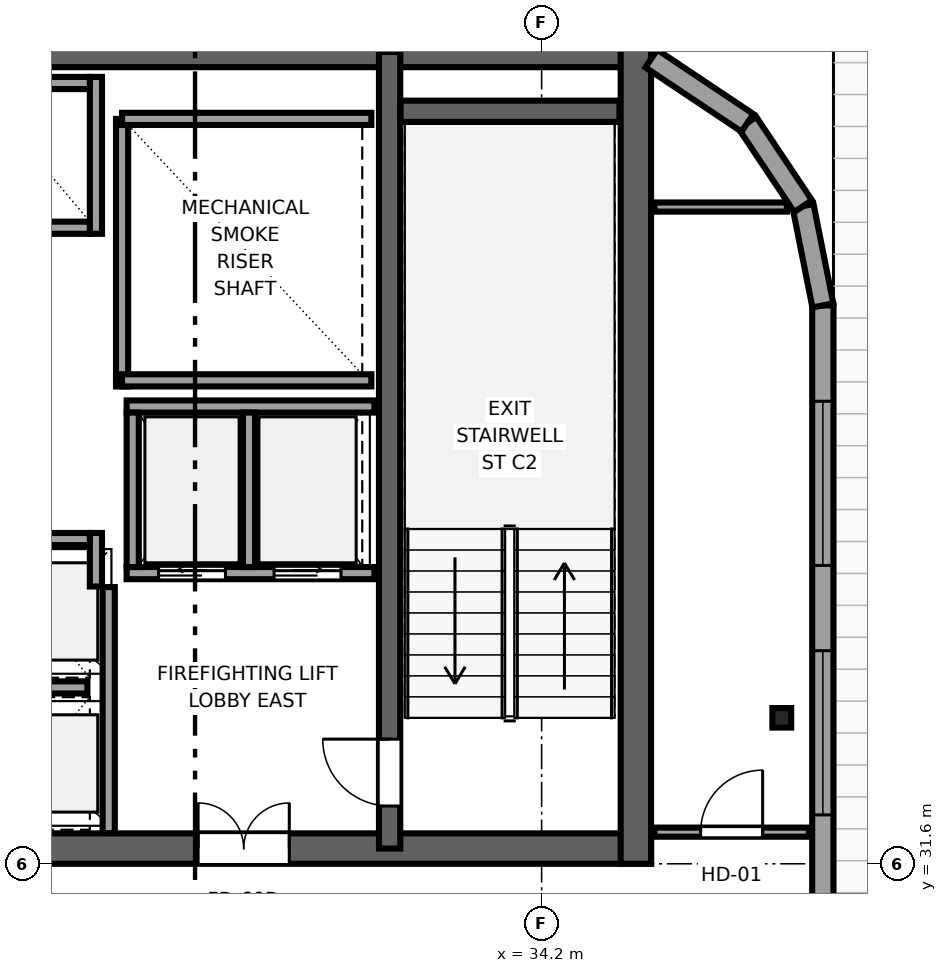
"""IFC4 building model, lengths in metres.
Left out: names, types, materials, properties, quantities, classifications, styles, units other than length and angle.
Written with IfcOpenShell. Run it as: python <this file> out.ifc"""

import sys

from ifc_helpers import new_model, si_unit, direction, frame, frame_2d, origin, origin_2d, place, context, subcontext, project, spatial, rectangle, i_section, extrude, source, transform, mapped, element, fill, save


model = new_model("IFC4")
c1 = context("Model", 3, precision=1e-05, world=origin(), true_north=direction((0.0, 1.0)))
c2 = subcontext(c1, "Body", "Model", "MODEL_VIEW")
j1 = project(units=[si_unit("LENGTHUNIT", "METRE"), si_unit("PLANEANGLEUNIT", "RADIAN")], contexts=[c1])
p1 = place(None, origin())
s1 = spatial("IfcSite", under=j1, at=p1, CompositionType="ELEMENT")
p2 = place(p1, origin())
s2 = spatial("IfcBuilding", under=s1, at=p2, CompositionType="ELEMENT")
p3 = place(p2, frame((0.0, 0.0, 241.65)))
s3 = spatial("IfcBuildingStorey", under=s2, at=p3, CompositionType="ELEMENT", Elevation=241.65)
p4 = place(p3, frame((10.0, 31.85, 0.0), z_axis=(0.0, 0.0, 1.0), x_axis=(1.0, 0.0, 0.0)))
e1 = element("IfcWall", 1, at=p4, inside=s3, PredefinedType="SHEAR", context=c2, shape_type="SweptSolid", body=[
    extrude(rectangle(XDim=26.0, YDim=0.5, at=frame_2d((13.0, 0.0))), origin(), (0.0, 0.0, 1.0), 3.55),
])
p5 = place(p4, frame((7.45, 0.0, 0.0), z_axis=(0.0, 0.0, 1.0), x_axis=(-1.0, 0.0, 0.0)))
e2 = element("IfcOpeningElement", 2, at=p5, cuts=e1, PredefinedType="OPENING", context=c2, shape_type="SweptSolid", body=[
    extrude(rectangle(XDim=1.5, YDim=2.04, at=frame_2d((0.75, 1.02))), frame((0.0, 0.26, 0.0), z_axis=(0.0, -1.0, 0.0), x_axis=(1.0, 0.0, 0.0)), (0.0, 0.0, 1.0), 0.52),
])
p6 = place(p4, frame((13.75, 0.0, 0.0), z_axis=(0.0, 0.0, 1.0), x_axis=(-1.0, 0.0, 0.0)))
e3 = element("IfcOpeningElement", 3, at=p6, cuts=e1, PredefinedType="OPENING", context=c2, shape_type="SweptSolid", body=[
    extrude(rectangle(XDim=1.5, YDim=2.04, at=frame_2d((0.75, 1.02))), frame((0.0, 0.26, 0.0), z_axis=(0.0, -1.0, 0.0), x_axis=(1.0, 0.0, 0.0)), (0.0, 0.0, 1.0), 0.52),
])
p7 = place(p4, frame((20.05, 0.0, 0.0), z_axis=(0.0, 0.0, 1.0), x_axis=(-1.0, 0.0, 0.0)))
e4 = element("IfcOpeningElement", 4, at=p7, cuts=e1, PredefinedType="OPENING", context=c2, shape_type="SweptSolid", body=[
    extrude(rectangle(XDim=1.5, YDim=2.04, at=frame_2d((0.75, 1.02))), frame((0.0, 0.26, 0.0), z_axis=(0.0, -1.0, 0.0), x_axis=(1.0, 0.0, 0.0)), (0.0, 0.0, 1.0), 0.52),
])
p8 = place(p3, frame((10.0, 44.95, 0.0), z_axis=(0.0, 0.0, 1.0), x_axis=(1.0, 0.0, 0.0)))
e5 = element("IfcWall", 5, at=p8, inside=s3, PredefinedType="SHEAR", context=c2, shape_type="SweptSolid", body=[
    extrude(rectangle(XDim=26.0, YDim=0.5, at=frame_2d((13.0, 0.0))), origin(), (0.0, 0.0, 1.0), 3.55),
])
p9 = place(p3, frame((35.75, 31.6, 0.0), z_axis=(0.0, 0.0, 1.0), x_axis=(0.0, 1.0, 0.0)))
e6 = element("IfcWall", 6, at=p9, inside=s3, PredefinedType="SHEAR", context=c2, shape_type="SweptSolid", body=[
    extrude(rectangle(XDim=13.6, YDim=0.5, at=frame_2d((6.8, 0.0))), origin(), (0.0, 0.0, 1.0), 3.55),
])
p10 = place(p3, frame((31.7, 31.85, 0.0), z_axis=(0.0, 0.0, 1.0), x_axis=(0.0, 1.0, 0.0)))
e7 = element("IfcWall", 7, at=p10, inside=s3, PredefinedType="SHEAR", context=c2, shape_type="SweptSolid", body=[
    extrude(rectangle(XDim=13.1, YDim=0.35, at=frame_2d((6.55, 0.0))), origin(), (0.0, 0.0, 1.0), 3.55),
])
p11 = place(p10, frame((1.8, 0.0, 0.0), z_axis=(0.0, 0.0, 1.0), x_axis=(-1.0, 0.0, 0.0)))
e8 = element("IfcOpeningElement", 8, at=p11, cuts=e7, PredefinedType="OPENING", context=c2, shape_type="SweptSolid", body=[
    extrude(rectangle(XDim=1.1, YDim=2.12, at=frame_2d((0.55, 1.06))), frame((0.0, 0.185, 0.0), z_axis=(0.0, -1.0, 0.0), x_axis=(1.0, 0.0, 0.0)), (0.0, 0.0, 1.0), 0.37),
])
p12 = place(p3, frame((31.88, 43.975, 0.0), z_axis=(0.0, 0.0, 1.0), x_axis=(1.0, 0.0, 0.0)))
e9 = element("IfcWall", 9, at=p12, inside=s3, PredefinedType="SHEAR", context=c2, shape_type="SweptSolid", body=[
    extrude(rectangle(XDim=3.6, YDim=0.35, at=frame_2d((1.8, 0.0))), origin(), (0.0, 0.0, 1.0), 3.55),
])
m1 = source(origin(), c2, "Body", "SweptSolid", [
    extrude(i_section(OverallWidth=0.309, OverallDepth=0.321, WebThickness=0.014, FlangeThickness=0.022, FilletRadius=0.017, at=origin_2d()), origin(), (0.0, 0.0, 1.0), 3.55),
])
p13 = place(p3, frame((38.15, 34.0, 0.0), z_axis=(0.0, 0.0, 1.0), x_axis=(1.0, 0.0, 0.0)))
e10 = element("IfcColumn", 10, at=p13, inside=s3, PredefinedType="COLUMN", context=c2, shape_type="MappedRepresentation", body=[
    mapped(m1, transform((0.0, 0.0, 0.0), x_axis=(1.0, 0.0, 0.0), y_axis=(0.0, 1.0, 0.0), z_axis=(0.0, 0.0, 1.0), scale=1.0)),
])
p14 = place(p3, frame((38.825, 7.017, 0.0), z_axis=(0.0, 0.0, 1.0), x_axis=(0.0, 1.0, 0.0)))
e11 = element("IfcWall", 11, at=p14, inside=s3, PredefinedType="SOLIDWALL", context=c2, shape_type="SweptSolid", body=[
    extrude(rectangle(XDim=33.766, YDim=0.35, at=frame_2d((16.883, 0.0))), origin(), (0.0, 0.0, 1.0), 3.37),
])
p15 = place(p14, frame((1.576, 0.0, 0.68)))
e12 = element("IfcOpeningElement", 12, at=p15, cuts=e11, PredefinedType="OPENING", context=c2, shape_type="SweptSolid", body=[
    extrude(rectangle(XDim=2.7, YDim=1.95, at=frame_2d((1.35, 0.975))), frame((0.0, 0.185, 0.0), z_axis=(0.0, -1.0, 0.0), x_axis=(1.0, 0.0, 0.0)), (0.0, 0.0, 1.0), 0.37),
])
p16 = place(p14, frame((6.228, 0.0, 0.68)))
e13 = element("IfcOpeningElement", 13, at=p16, cuts=e11, PredefinedType="OPENING", context=c2, shape_type="SweptSolid", body=[
    extrude(rectangle(XDim=2.7, YDim=1.95, at=frame_2d((1.35, 0.975))), frame((0.0, 0.185, 0.0), z_axis=(0.0, -1.0, 0.0), x_axis=(1.0, 0.0, 0.0)), (0.0, 0.0, 1.0), 0.37),
])
p17 = place(p14, frame((10.881, 0.0, 0.68)))
e14 = element("IfcOpeningElement", 14, at=p17, cuts=e11, PredefinedType="OPENING", context=c2, shape_type="SweptSolid", body=[
    extrude(rectangle(XDim=2.7, YDim=1.95, at=frame_2d((1.35, 0.975))), frame((0.0, 0.185, 0.0), z_axis=(0.0, -1.0, 0.0), x_axis=(1.0, 0.0, 0.0)), (0.0, 0.0, 1.0), 0.37),
])
p18 = place(p14, frame((15.533, 0.0, 0.68)))
e15 = element("IfcOpeningElement", 15, at=p18, cuts=e11, PredefinedType="OPENING", context=c2, shape_type="SweptSolid", body=[
    extrude(rectangle(XDim=2.7, YDim=1.95, at=frame_2d((1.35, 0.975))), frame((0.0, 0.185, 0.0), z_axis=(0.0, -1.0, 0.0), x_axis=(1.0, 0.0, 0.0)), (0.0, 0.0, 1.0), 0.37),
])
p19 = place(p14, frame((19.635, 0.0, 0.68)))
e16 = element("IfcOpeningElement", 16, at=p19, cuts=e11, PredefinedType="OPENING", context=c2, shape_type="SweptSolid", body=[
    extrude(rectangle(XDim=2.7, YDim=1.95, at=frame_2d((1.35, 0.975))), frame((0.0, 0.185, 0.0), z_axis=(0.0, -1.0, 0.0), x_axis=(1.0, 0.0, 0.0)), (0.0, 0.0, 1.0), 0.37),
])
p20 = place(p14, frame((25.387, 0.0, 0.68)))
e17 = element("IfcOpeningElement", 17, at=p20, cuts=e11, PredefinedType="OPENING", context=c2, shape_type="SweptSolid", body=[
    extrude(rectangle(XDim=2.7, YDim=1.95, at=frame_2d((1.35, 0.975))), frame((0.0, 0.185, 0.0), z_axis=(0.0, -1.0, 0.0), x_axis=(1.0, 0.0, 0.0)), (0.0, 0.0, 1.0), 0.37),
])
p21 = place(p14, frame((29.489, 0.0, 0.68)))
e18 = element("IfcOpeningElement", 18, at=p21, cuts=e11, PredefinedType="OPENING", context=c2, shape_type="SweptSolid", body=[
    extrude(rectangle(XDim=2.7, YDim=1.95, at=frame_2d((1.35, 0.975))), frame((0.0, 0.185, 0.0), z_axis=(0.0, -1.0, 0.0), x_axis=(1.0, 0.0, 0.0)), (0.0, 0.0, 1.0), 0.37),
])
p22 = place(p3, frame((38.825, 40.783, 0.0), z_axis=(0.0, 0.0, 1.0), x_axis=(-0.195044345786, 0.980794424524, 0.0)))
e19 = element("IfcWall", 19, at=p22, inside=s3, PredefinedType="SOLIDWALL", context=c2, shape_type="SweptSolid", body=[
    extrude(rectangle(XDim=1.665, YDim=0.35, at=frame_2d((0.833, 0.0))), origin(), (0.0, 0.0, 1.0), 3.37),
])
p23 = place(p3, frame((38.5, 42.416, 0.0), z_axis=(0.0, 0.0, 1.0), x_axis=(-0.555520825599, 0.831502623162, 0.0)))
e20 = element("IfcWall", 20, at=p23, inside=s3, PredefinedType="SOLIDWALL", context=c2, shape_type="SweptSolid", body=[
    extrude(rectangle(XDim=1.647, YDim=0.35, at=frame_2d((0.824, 0.0))), origin(), (0.0, 0.0, 1.0), 3.37),
])
p24 = place(p3, frame((37.585, 43.785, 0.0), z_axis=(0.0, 0.0, 1.0), x_axis=(-0.831516639465, 0.555499845448, 0.0)))
e21 = element("IfcWall", 21, at=p24, inside=s3, PredefinedType="SOLIDWALL", context=c2, shape_type="SweptSolid", body=[
    extrude(rectangle(XDim=1.902, YDim=0.35, at=frame_2d((0.951, 0.0))), origin(), (0.0, 0.0, 1.0), 3.37),
])
p25 = place(p3, frame((27.3, 39.45, 0.0), z_axis=(0.0, 0.0, 1.0), x_axis=(0.0, 1.0, 0.0)))
e22 = element("IfcWall", 22, at=p25, inside=s3, PredefinedType="SOLIDWALL", context=c2, shape_type="SweptSolid", body=[
    extrude(rectangle(XDim=4.4, YDim=0.2, at=frame_2d((2.2, 0.0))), origin(), (0.0, 0.0, 1.0), 3.37),
])
for number, where, z_axis, x_axis in (
    (23, (27.3, 39.55, 0.0), (0.0, 0.0, 1.0), (1.0, 0.0, 0.0)),
    (24, (27.3, 43.85, 0.0), (0.0, 0.0, 1.0), (1.0, 0.0, 0.0)),
):
    element("IfcWall", number, at=place(p3, frame(where, z_axis=z_axis, x_axis=x_axis)), inside=s3, PredefinedType="SOLIDWALL", context=c2, shape_type="SweptSolid", body=[
        extrude(rectangle(XDim=4.1, YDim=0.2, at=frame_2d((2.05, 0.0))), origin(), (0.0, 0.0, 1.0), 3.37),
    ])
p26 = place(p3, frame((27.08, 32.104, 0.0), z_axis=(0.0, 0.0, 1.0), x_axis=(0.0, 1.0, 0.0)))
e25 = element("IfcWall", 25, at=p26, inside=s3, PredefinedType="SOLIDWALL", context=c2, shape_type="SweptSolid", body=[
    extrude(rectangle(XDim=4.046, YDim=0.2, at=frame_2d((2.023, 0.0))), origin(), (0.0, 0.0, 1.0), 3.37),
])
p27 = place(p3, frame((27.375, 36.38, 0.0), z_axis=(0.0, 0.0, 1.0), x_axis=(1.0, 0.0, 0.0)))
e26 = element("IfcWall", 26, at=p27, inside=s3, PredefinedType="SOLIDWALL", context=c2, shape_type="SweptSolid", body=[
    extrude(rectangle(XDim=4.075, YDim=0.2, at=frame_2d((2.038, 0.0))), origin(), (0.0, 0.0, 1.0), 3.37),
])
p28 = place(p27, frame((0.525, 0.0, 0.0)))
e27 = element("IfcOpeningElement", 27, at=p28, cuts=e26, PredefinedType="OPENING", context=c2, shape_type="SweptSolid", body=[
    extrude(rectangle(XDim=1.1, YDim=2.12, at=frame_2d((0.55, 1.06))), frame((0.0, 0.11, 0.0), z_axis=(0.0, -1.0, 0.0), x_axis=(1.0, 0.0, 0.0)), (0.0, 0.0, 1.0), 0.22),
])
p29 = place(p27, frame((2.425, 0.0, 0.0)))
e28 = element("IfcOpeningElement", 28, at=p29, cuts=e26, PredefinedType="OPENING", context=c2, shape_type="SweptSolid", body=[
    extrude(rectangle(XDim=1.1, YDim=2.12, at=frame_2d((0.55, 1.06))), frame((0.0, 0.11, 0.0), z_axis=(0.0, -1.0, 0.0), x_axis=(1.0, 0.0, 0.0)), (0.0, 0.0, 1.0), 0.22),
])
p30 = place(p3, frame((27.375, 39.12, 0.0), z_axis=(0.0, 0.0, 1.0), x_axis=(1.0, 0.0, 0.0)))
e29 = element("IfcWall", 29, at=p30, inside=s3, PredefinedType="SOLIDWALL", context=c2, shape_type="SweptSolid", body=[
    extrude(rectangle(XDim=4.075, YDim=0.2, at=frame_2d((2.038, 0.0))), origin(), (0.0, 0.0, 1.0), 3.37),
])
for number, where, z_axis, x_axis in (
    (30, (27.475, 36.48, 0.0), (0.0, 0.0, 1.0), (0.0, 1.0, 0.0)),
    (31, (29.387, 36.48, 0.0), (0.0, 0.0, 1.0), (0.0, 1.0, 0.0)),
):
    element("IfcWall", number, at=place(p3, frame(where, z_axis=z_axis, x_axis=x_axis)), inside=s3, PredefinedType="SOLIDWALL", context=c2, shape_type="SweptSolid", body=[
        extrude(rectangle(XDim=2.54, YDim=0.2, at=frame_2d((1.27, 0.0))), origin(), (0.0, 0.0, 1.0), 3.37),
    ])
p31 = place(p3, frame((26.87, 36.16, 0.0), z_axis=(0.0, 0.0, 1.0), x_axis=(0.0, 1.0, 0.0)))
e32 = element("IfcWall", 32, at=p31, inside=s3, PredefinedType="SOLIDWALL", context=c2, shape_type="SweptSolid", body=[
    extrude(rectangle(XDim=0.88, YDim=0.2, at=frame_2d((0.44, 0.0))), origin(), (0.0, 0.0, 1.0), 3.37),
])
p32 = place(p3, frame((24.93, 36.94, 0.0), z_axis=(0.0, 0.0, 1.0), x_axis=(1.0, 0.0, 0.0)))
e33 = element("IfcWall", 33, at=p32, inside=s3, PredefinedType="SOLIDWALL", context=c2, shape_type="SweptSolid", body=[
    extrude(rectangle(XDim=1.84, YDim=0.2, at=frame_2d((0.92, 0.0))), origin(), (0.0, 0.0, 1.0), 3.37),
])
p33 = place(p3, frame((24.93, 34.5, 0.0), z_axis=(0.0, 0.0, 1.0), x_axis=(1.0, 0.0, 0.0)))
e34 = element("IfcWall", 34, at=p33, inside=s3, PredefinedType="SOLIDWALL", context=c2, shape_type="SweptSolid", body=[
    extrude(rectangle(XDim=1.8, YDim=0.2, at=frame_2d((0.9, 0.0))), origin(), (0.0, 0.0, 1.0), 3.37),
])
p34 = place(p3, frame((26.87, 41.96, 0.0), z_axis=(0.0, 0.0, 1.0), x_axis=(0.0, 1.0, 0.0)))
e35 = element("IfcWall", 35, at=p34, inside=s3, PredefinedType="SOLIDWALL", context=c2, shape_type="SweptSolid", body=[
    extrude(rectangle(XDim=2.58, YDim=0.2, at=frame_2d((1.29, 0.0))), origin(), (0.0, 0.0, 1.0), 3.37),
])
for number, where, z_axis, x_axis in (
    (36, (24.93, 42.06, 0.0), (0.0, 0.0, 1.0), (1.0, 0.0, 0.0)),
    (37, (24.93, 44.44, 0.0), (0.0, 0.0, 1.0), (1.0, 0.0, 0.0)),
):
    element("IfcWall", number, at=place(p3, frame(where, z_axis=z_axis, x_axis=x_axis)), inside=s3, PredefinedType="SOLIDWALL", context=c2, shape_type="SweptSolid", body=[
        extrude(rectangle(XDim=1.84, YDim=0.2, at=frame_2d((0.92, 0.0))), origin(), (0.0, 0.0, 1.0), 3.37),
    ])
p35 = place(p3, frame((36.055, 32.12, 0.0), z_axis=(0.0, 0.0, 1.0), x_axis=(1.0, 0.0, 0.0)))
e38 = element("IfcWall", 38, at=p35, inside=s3, PredefinedType="PARTITIONING", context=c2, shape_type="SweptSolid", body=[
    extrude(rectangle(XDim=2.54, YDim=0.15, at=frame_2d((1.27, 0.0))), origin(), (0.0, 0.0, 1.0), 3.37),
])
p36 = place(p35, frame((0.76, 0.0, 0.0)))
e39 = element("IfcOpeningElement", 39, at=p36, cuts=e38, PredefinedType="OPENING", context=c2, shape_type="SweptSolid", body=[
    extrude(rectangle(XDim=1.02, YDim=2.03, at=frame_2d((0.51, 1.015))), frame((0.0, 0.085, 0.0), z_axis=(0.0, -1.0, 0.0), x_axis=(1.0, 0.0, 0.0)), (0.0, 0.0, 1.0), 0.17),
])
p37 = place(p3, frame((36.055, 42.4, 0.0), z_axis=(0.0, 0.0, 1.0), x_axis=(1.0, 0.0, 0.0)))
e40 = element("IfcWall", 40, at=p37, inside=s3, PredefinedType="PARTITIONING", context=c2, shape_type="SweptSolid", body=[
    extrude(rectangle(XDim=2.179, YDim=0.15, at=frame_2d((1.089, 0.0))), origin(), (0.0, 0.0, 1.0), 3.37),
])
m2 = source(origin(), c2, "Body", "SweptSolid", [
    extrude(rectangle(XDim=2.7, YDim=1.95, at=frame_2d((1.35, 0.975))), frame((0.0, 0.09, 0.0), z_axis=(0.0, -1.0, 0.0), x_axis=(1.0, 0.0, 0.0)), (0.0, 0.0, 1.0), 0.06),
])
p38 = place(p20, origin())
e41 = element("IfcWindow", 41, at=p38, inside=s3, PartitioningType="TRIPLE_PANEL_HORIZONTAL", PredefinedType="WINDOW", context=c2, shape_type="MappedRepresentation", body=[
    mapped(m2, transform((0.0, 0.0, 0.0), x_axis=(1.0, 0.0, 0.0), y_axis=(0.0, 1.0, 0.0), z_axis=(0.0, 0.0, 1.0), scale=1.0)),
])
fill(e17, e41)
p39 = place(p21, origin())
e42 = element("IfcWindow", 42, at=p39, inside=s3, PartitioningType="TRIPLE_PANEL_HORIZONTAL", PredefinedType="WINDOW", context=c2, shape_type="MappedRepresentation", body=[
    mapped(m2, transform((0.0, 0.0, 0.0), x_axis=(1.0, 0.0, 0.0), y_axis=(0.0, 1.0, 0.0), z_axis=(0.0, 0.0, 1.0), scale=1.0)),
])
fill(e18, e42)
m3 = source(origin(), c2, "Body", "SweptSolid", [
    extrude(rectangle(XDim=1.1, YDim=2.12, at=frame_2d((0.55, 1.06))), frame((0.0, 0.025, 0.0), z_axis=(0.0, -1.0, 0.0), x_axis=(1.0, 0.0, 0.0)), (0.0, 0.0, 1.0), 0.05),
])
p40 = place(p11, origin())
e43 = element("IfcDoor", 43, at=p40, inside=s3, OperationType="SINGLE_SWING_RIGHT", PredefinedType="DOOR", context=c2, shape_type="MappedRepresentation", body=[
    mapped(m3, transform((0.0, 0.0, 0.0), x_axis=(1.0, 0.0, 0.0), y_axis=(0.0, 1.0, 0.0), z_axis=(0.0, 0.0, 1.0), scale=1.0)),
])
fill(e8, e43)
m4 = source(origin(), c2, "Body", "SweptSolid", [
    extrude(rectangle(XDim=1.5, YDim=2.04, at=frame_2d((0.75, 1.02))), frame((0.0, 0.025, 0.0), z_axis=(0.0, -1.0, 0.0), x_axis=(1.0, 0.0, 0.0)), (0.0, 0.0, 1.0), 0.05),
])
p41 = place(p7, origin())
e44 = element("IfcDoor", 44, at=p41, inside=s3, OperationType="DOUBLE_DOOR_SINGLE_SWING", PredefinedType="DOOR", context=c2, shape_type="MappedRepresentation", body=[
    mapped(m4, transform((0.0, 0.0, 0.0), x_axis=(1.0, 0.0, 0.0), y_axis=(0.0, 1.0, 0.0), z_axis=(0.0, 0.0, 1.0), scale=1.0)),
])
fill(e4, e44)
m5 = source(origin(), c2, "Body", "SweptSolid", [
    extrude(rectangle(XDim=1.1, YDim=2.12, at=frame_2d((0.55, 1.06))), frame((0.0, 0.025, 0.0), z_axis=(0.0, -1.0, 0.0), x_axis=(1.0, 0.0, 0.0)), (0.0, 0.0, 1.0), 0.05),
])
p42 = place(p28, origin())
e45 = element("IfcDoor", 45, at=p42, inside=s3, OperationType="SLIDING_TO_LEFT", PredefinedType="DOOR", context=c2, shape_type="MappedRepresentation", body=[
    mapped(m5, transform((0.0, 0.0, 0.0), x_axis=(1.0, 0.0, 0.0), y_axis=(0.0, 1.0, 0.0), z_axis=(0.0, 0.0, 1.0), scale=1.0)),
])
fill(e27, e45)
p43 = place(p29, origin())
e46 = element("IfcDoor", 46, at=p43, inside=s3, OperationType="SLIDING_TO_RIGHT", PredefinedType="DOOR", context=c2, shape_type="MappedRepresentation", body=[
    mapped(m5, transform((0.0, 0.0, 0.0), x_axis=(1.0, 0.0, 0.0), y_axis=(0.0, 1.0, 0.0), z_axis=(0.0, 0.0, 1.0), scale=1.0)),
])
fill(e28, e46)
m6 = source(origin(), c2, "Body", "SweptSolid", [
    extrude(rectangle(XDim=1.02, YDim=2.03, at=frame_2d((0.51, 1.015))), frame((0.0, 0.025, 0.0), z_axis=(0.0, -1.0, 0.0), x_axis=(1.0, 0.0, 0.0)), (0.0, 0.0, 1.0), 0.05),
])
p44 = place(p36, origin())
e47 = element("IfcDoor", 47, at=p44, inside=s3, OperationType="SINGLE_SWING_RIGHT", PredefinedType="DOOR", context=c2, shape_type="MappedRepresentation", body=[
    mapped(m6, transform((0.0, 0.0, 0.0), x_axis=(1.0, 0.0, 0.0), y_axis=(0.0, 1.0, 0.0), z_axis=(0.0, 0.0, 1.0), scale=1.0)),
])
fill(e39, e47)
save(model, sys.argv[1])
